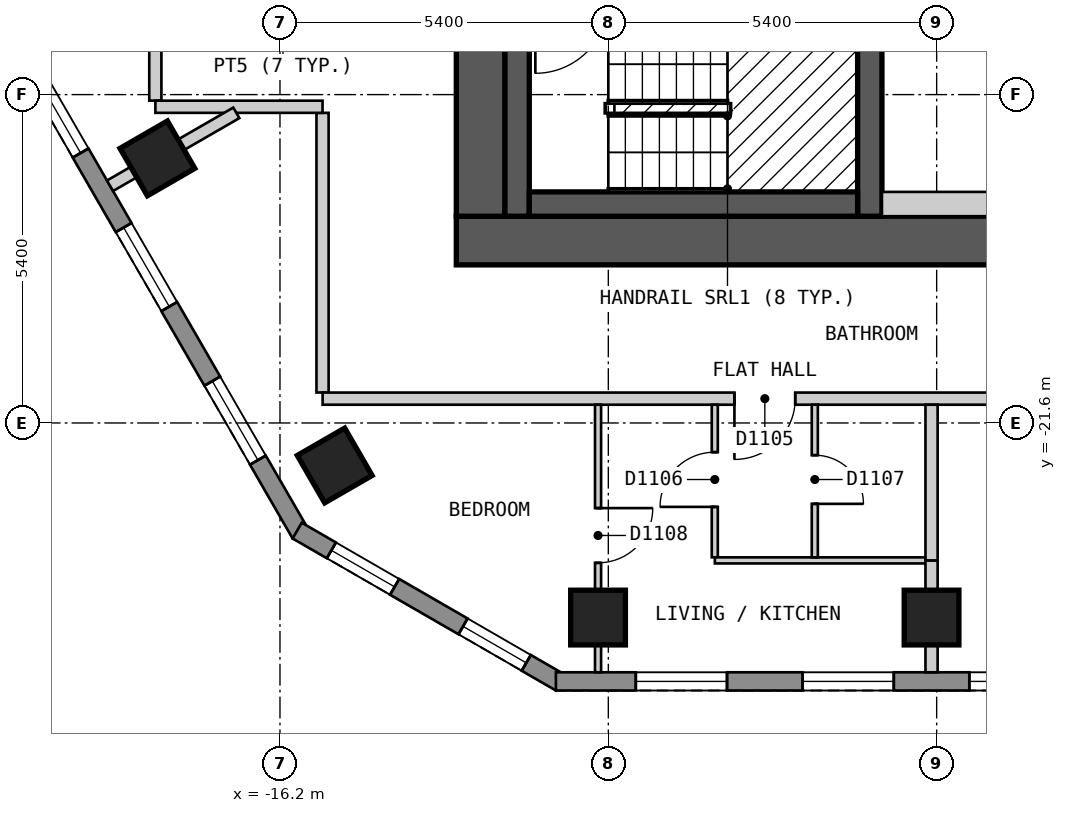
"""IFC4 building model, lengths in metres.
Left out: names, types, materials, properties, quantities, classifications, styles, units other than length and angle.
Written with IfcOpenShell. Run it as: python <this file> out.ifc"""

import sys

from ifc_helpers import new_model, si_unit, direction, frame, frame_2d, origin, origin_2d, place, context, subcontext, project, spatial, polyline, rectangle, outline, extrude, element, fill, save


model = new_model("IFC4")
c1 = context("Model", 3, precision=1e-05, world=origin(), true_north=direction((0.0, 1.0)))
c2 = subcontext(c1, "Body", "Model", "MODEL_VIEW")
j1 = project(units=[si_unit("LENGTHUNIT", "METRE"), si_unit("PLANEANGLEUNIT", "RADIAN")], contexts=[c1])
p1 = place(None, origin())
s1 = spatial("IfcSite", under=j1, at=p1, CompositionType="ELEMENT")
p2 = place(p1, origin())
s2 = spatial("IfcBuilding", under=s1, at=p2, CompositionType="ELEMENT")
p3 = place(p2, frame((0.0, 0.0, 144.6)))
s3 = spatial("IfcBuildingStorey", under=s2, at=p3, CompositionType="ELEMENT", Elevation=144.6)
for number, where, z_axis, x_axis in (
    (1, (-18.216, -17.249, 0.0), (0.0, 0.0, 1.0), (0.5, -0.866, 0.0)),
    (2, (-15.3, -22.299, 0.0), (0.0, 0.0, 1.0), (0.5, -0.866, 0.0)),
    (3, (-10.969, -24.8, 0.0), (0.0, 0.0, 1.0), (1.0, 0.0, 0.0)),
    (4, (-5.484, -24.8, 0.0), (0.0, 0.0, 1.0), (1.0, 0.0, 0.0)),
):
    element("IfcColumn", number, at=place(p3, frame(where, z_axis=z_axis, x_axis=x_axis)), inside=s3, PredefinedType="COLUMN", context=c2, shape_type="SweptSolid", body=[
        extrude(rectangle(XDim=0.9, YDim=0.9, at=origin_2d()), origin(), (0.0, 0.0, 1.0), 3.0),
    ])
p4 = place(p3, frame((-13.3, -18.6, 0.0), z_axis=(0.0, 0.0, 1.0), x_axis=(1.0, 0.0, 0.0)))
e5 = element("IfcWall", 5, at=p4, inside=s3, PredefinedType="SHEAR", context=c2, shape_type="SweptSolid", body=[
    extrude(rectangle(XDim=26.6, YDim=0.8, at=frame_2d((13.3, 0.0))), origin(), (0.0, 0.0, 1.0), 2.7),
])
p5 = place(p3, frame((-12.9, -18.2, 0.0), z_axis=(0.0, 0.0, 1.0), x_axis=(0.0, 1.0, 0.0)))
e6 = element("IfcWall", 6, at=p5, inside=s3, PredefinedType="SHEAR", context=c2, shape_type="SweptSolid", body=[
    extrude(rectangle(XDim=12.4, YDim=0.8, at=frame_2d((6.2, 0.0))), origin(), (0.0, 0.0, 1.0), 2.7),
])
p6 = place(p5, frame((4.0, 0.0, 0.0)))
e7 = element("IfcOpeningElement", 7, at=p6, cuts=e6, PredefinedType="OPENING", context=c2, shape_type="SweptSolid", body=[
    extrude(rectangle(XDim=1.2, YDim=2.1, at=frame_2d((0.6, 1.05))), frame((0.0, 0.41, 0.0), z_axis=(0.0, -1.0, 0.0), x_axis=(1.0, 0.0, 0.0)), (0.0, 0.0, 1.0), 0.82),
])
p7 = place(p3, frame((-6.5, -18.2, 0.0), z_axis=(0.0, 0.0, 1.0), x_axis=(0.0, 1.0, 0.0)))
e8 = element("IfcWall", 8, at=p7, inside=s3, PredefinedType="SHEAR", context=c2, shape_type="SweptSolid", body=[
    extrude(rectangle(XDim=3.35, YDim=0.4, at=frame_2d((1.675, 0.0))), origin(), (0.0, 0.0, 1.0), 2.7),
])
p8 = place(p3, frame((-28.218, -2.025, 0.0), z_axis=(0.0, 0.0, 1.0), x_axis=(0.500017503135, -0.866015298109, 0.0)))
e9 = element("IfcWall", 9, at=p8, inside=s3, PredefinedType="SOLIDWALL", context=c2, shape_type="SweptSolid", body=[
    extrude(outline(polyline([(0.0, -0.15), (24.711, -0.15), (24.631, 0.15), (0.08, 0.15), (0.0, -0.15)])), origin(), (0.0, 0.0, 1.0), 2.7),
])
p9 = place(p8, frame((1.4, 0.0, 0.15)))
e10 = element("IfcOpeningElement", 10, at=p9, cuts=e9, PredefinedType="OPENING", context=c2, shape_type="SweptSolid", body=[
    extrude(rectangle(XDim=1.5, YDim=2.1, at=frame_2d((0.75, 1.05))), frame((0.0, 0.16, 0.0), z_axis=(0.0, -1.0, 0.0), x_axis=(1.0, 0.0, 0.0)), (0.0, 0.0, 1.0), 0.32),
])
p10 = place(p8, frame((4.316, 0.0, 0.15)))
e11 = element("IfcOpeningElement", 11, at=p10, cuts=e9, PredefinedType="OPENING", context=c2, shape_type="SweptSolid", body=[
    extrude(rectangle(XDim=1.5, YDim=2.1, at=frame_2d((0.75, 1.05))), frame((0.0, 0.16, 0.0), z_axis=(0.0, -1.0, 0.0), x_axis=(1.0, 0.0, 0.0)), (0.0, 0.0, 1.0), 0.32),
])
p11 = place(p8, frame((7.231, 0.0, 0.15)))
e12 = element("IfcOpeningElement", 12, at=p11, cuts=e9, PredefinedType="OPENING", context=c2, shape_type="SweptSolid", body=[
    extrude(rectangle(XDim=1.5, YDim=2.1, at=frame_2d((0.75, 1.05))), frame((0.0, 0.16, 0.0), z_axis=(0.0, -1.0, 0.0), x_axis=(1.0, 0.0, 0.0)), (0.0, 0.0, 1.0), 0.32),
])
p12 = place(p8, frame((10.147, 0.0, 0.15)))
e13 = element("IfcOpeningElement", 13, at=p12, cuts=e9, PredefinedType="OPENING", context=c2, shape_type="SweptSolid", body=[
    extrude(rectangle(XDim=1.5, YDim=2.1, at=frame_2d((0.75, 1.05))), frame((0.0, 0.16, 0.0), z_axis=(0.0, -1.0, 0.0), x_axis=(1.0, 0.0, 0.0)), (0.0, 0.0, 1.0), 0.32),
])
p13 = place(p8, frame((13.062, 0.0, 0.15)))
e14 = element("IfcOpeningElement", 14, at=p13, cuts=e9, PredefinedType="OPENING", context=c2, shape_type="SweptSolid", body=[
    extrude(rectangle(XDim=1.5, YDim=2.1, at=frame_2d((0.75, 1.05))), frame((0.0, 0.16, 0.0), z_axis=(0.0, -1.0, 0.0), x_axis=(1.0, 0.0, 0.0)), (0.0, 0.0, 1.0), 0.32),
])
p14 = place(p8, frame((15.977, 0.0, 0.15)))
e15 = element("IfcOpeningElement", 15, at=p14, cuts=e9, PredefinedType="OPENING", context=c2, shape_type="SweptSolid", body=[
    extrude(rectangle(XDim=1.5, YDim=2.1, at=frame_2d((0.75, 1.05))), frame((0.0, 0.16, 0.0), z_axis=(0.0, -1.0, 0.0), x_axis=(1.0, 0.0, 0.0)), (0.0, 0.0, 1.0), 0.32),
])
p15 = place(p8, frame((18.893, 0.0, 0.15)))
e16 = element("IfcOpeningElement", 16, at=p15, cuts=e9, PredefinedType="OPENING", context=c2, shape_type="SweptSolid", body=[
    extrude(rectangle(XDim=1.5, YDim=2.1, at=frame_2d((0.75, 1.05))), frame((0.0, 0.16, 0.0), z_axis=(0.0, -1.0, 0.0), x_axis=(1.0, 0.0, 0.0)), (0.0, 0.0, 1.0), 0.32),
])
p16 = place(p8, frame((21.809, 0.0, 0.15)))
e17 = element("IfcOpeningElement", 17, at=p16, cuts=e9, PredefinedType="OPENING", context=c2, shape_type="SweptSolid", body=[
    extrude(rectangle(XDim=1.5, YDim=2.1, at=frame_2d((0.75, 1.05))), frame((0.0, 0.16, 0.0), z_axis=(0.0, -1.0, 0.0), x_axis=(1.0, 0.0, 0.0)), (0.0, 0.0, 1.0), 0.32),
])
p17 = place(p3, frame((-15.917, -23.37, 0.0), z_axis=(0.0, 0.0, 1.0), x_axis=(0.866022959057, -0.500004234368, 0.0)))
e18 = element("IfcWall", 18, at=p17, inside=s3, PredefinedType="SOLIDWALL", context=c2, shape_type="SweptSolid", body=[
    extrude(outline(polyline([(0.0, -0.15), (5.0, -0.15), (4.92, 0.15), (0.08, 0.15), (0.0, -0.15)])), origin(), (0.0, 0.0, 1.0), 2.7),
])
p18 = place(p17, frame((0.65, 0.0, 0.15)))
e19 = element("IfcOpeningElement", 19, at=p18, cuts=e18, PredefinedType="OPENING", context=c2, shape_type="SweptSolid", body=[
    extrude(rectangle(XDim=1.2, YDim=2.1, at=frame_2d((0.6, 1.05))), frame((0.0, 0.16, 0.0), z_axis=(0.0, -1.0, 0.0), x_axis=(1.0, 0.0, 0.0)), (0.0, 0.0, 1.0), 0.32),
])
p19 = place(p17, frame((3.15, 0.0, 0.15)))
e20 = element("IfcOpeningElement", 20, at=p19, cuts=e18, PredefinedType="OPENING", context=c2, shape_type="SweptSolid", body=[
    extrude(rectangle(XDim=1.2, YDim=2.1, at=frame_2d((0.6, 1.05))), frame((0.0, 0.16, 0.0), z_axis=(0.0, -1.0, 0.0), x_axis=(1.0, 0.0, 0.0)), (0.0, 0.0, 1.0), 0.32),
])
p20 = place(p3, frame((-11.662, -25.85, 0.0), z_axis=(0.0, 0.0, 1.0), x_axis=(1.0, 0.0, 0.0)))
e21 = element("IfcWall", 21, at=p20, inside=s3, PredefinedType="SOLIDWALL", context=c2, shape_type="SweptSolid", body=[
    extrude(outline(polyline([(0.0, -0.15), (23.324, -0.15), (23.244, 0.15), (0.08, 0.15), (0.0, -0.15)])), origin(), (0.0, 0.0, 1.0), 2.7),
])
p21 = place(p20, frame((1.314, 0.0, 0.15)))
e22 = element("IfcOpeningElement", 22, at=p21, cuts=e21, PredefinedType="OPENING", context=c2, shape_type="SweptSolid", body=[
    extrude(rectangle(XDim=1.5, YDim=2.1, at=frame_2d((0.75, 1.05))), frame((0.0, 0.16, 0.0), z_axis=(0.0, -1.0, 0.0), x_axis=(1.0, 0.0, 0.0)), (0.0, 0.0, 1.0), 0.32),
])
p22 = place(p20, frame((4.057, 0.0, 0.15)))
e23 = element("IfcOpeningElement", 23, at=p22, cuts=e21, PredefinedType="OPENING", context=c2, shape_type="SweptSolid", body=[
    extrude(rectangle(XDim=1.5, YDim=2.1, at=frame_2d((0.75, 1.05))), frame((0.0, 0.16, 0.0), z_axis=(0.0, -1.0, 0.0), x_axis=(1.0, 0.0, 0.0)), (0.0, 0.0, 1.0), 0.32),
])
p23 = place(p20, frame((6.799, 0.0, 0.15)))
e24 = element("IfcOpeningElement", 24, at=p23, cuts=e21, PredefinedType="OPENING", context=c2, shape_type="SweptSolid", body=[
    extrude(rectangle(XDim=1.5, YDim=2.1, at=frame_2d((0.75, 1.05))), frame((0.0, 0.16, 0.0), z_axis=(0.0, -1.0, 0.0), x_axis=(1.0, 0.0, 0.0)), (0.0, 0.0, 1.0), 0.32),
])
p24 = place(p20, frame((9.542, 0.0, 0.15)))
e25 = element("IfcOpeningElement", 25, at=p24, cuts=e21, PredefinedType="OPENING", context=c2, shape_type="SweptSolid", body=[
    extrude(rectangle(XDim=1.5, YDim=2.1, at=frame_2d((0.75, 1.05))), frame((0.0, 0.16, 0.0), z_axis=(0.0, -1.0, 0.0), x_axis=(1.0, 0.0, 0.0)), (0.0, 0.0, 1.0), 0.32),
])
p25 = place(p20, frame((12.284, 0.0, 0.15)))
e26 = element("IfcOpeningElement", 26, at=p25, cuts=e21, PredefinedType="OPENING", context=c2, shape_type="SweptSolid", body=[
    extrude(rectangle(XDim=1.5, YDim=2.1, at=frame_2d((0.75, 1.05))), frame((0.0, 0.16, 0.0), z_axis=(0.0, -1.0, 0.0), x_axis=(1.0, 0.0, 0.0)), (0.0, 0.0, 1.0), 0.32),
])
p26 = place(p20, frame((15.027, 0.0, 0.15)))
e27 = element("IfcOpeningElement", 27, at=p26, cuts=e21, PredefinedType="OPENING", context=c2, shape_type="SweptSolid", body=[
    extrude(rectangle(XDim=1.5, YDim=2.1, at=frame_2d((0.75, 1.05))), frame((0.0, 0.16, 0.0), z_axis=(0.0, -1.0, 0.0), x_axis=(1.0, 0.0, 0.0)), (0.0, 0.0, 1.0), 0.32),
])
p27 = place(p20, frame((17.769, 0.0, 0.15)))
e28 = element("IfcOpeningElement", 28, at=p27, cuts=e21, PredefinedType="OPENING", context=c2, shape_type="SweptSolid", body=[
    extrude(rectangle(XDim=1.5, YDim=2.1, at=frame_2d((0.75, 1.05))), frame((0.0, 0.16, 0.0), z_axis=(0.0, -1.0, 0.0), x_axis=(1.0, 0.0, 0.0)), (0.0, 0.0, 1.0), 0.32),
])
p28 = place(p20, frame((20.512, 0.0, 0.15)))
e29 = element("IfcOpeningElement", 29, at=p28, cuts=e21, PredefinedType="OPENING", context=c2, shape_type="SweptSolid", body=[
    extrude(rectangle(XDim=1.5, YDim=2.1, at=frame_2d((0.75, 1.05))), frame((0.0, 0.16, 0.0), z_axis=(0.0, -1.0, 0.0), x_axis=(1.0, 0.0, 0.0)), (0.0, 0.0, 1.0), 0.32),
])
p29 = place(p3, frame((-15.5, -16.5, 0.0), z_axis=(0.0, 0.0, 1.0), x_axis=(0.0, -1.0, 0.0)))
e30 = element("IfcWall", 30, at=p29, inside=s3, PredefinedType="PARTITIONING", context=c2, shape_type="SweptSolid", body=[
    extrude(rectangle(XDim=4.599, YDim=0.2, at=frame_2d((2.3, 0.0))), origin(), (0.0, 0.0, 1.0), 2.7),
])
p30 = place(p3, frame((-18.25, -10.593, 0.0), z_axis=(0.0, 0.0, 1.0), x_axis=(0.0, -1.0, 0.0)))
e31 = element("IfcWall", 31, at=p30, inside=s3, PredefinedType="PARTITIONING", context=c2, shape_type="SweptSolid", body=[
    extrude(rectangle(XDim=5.706, YDim=0.2, at=frame_2d((2.853, 0.0))), origin(), (0.0, 0.0, 1.0), 2.7),
])
p31 = place(p3, frame((-18.249, -16.4, 0.0), z_axis=(0.0, 0.0, 1.0), x_axis=(1.0, 0.0, 0.0)))
e32 = element("IfcWall", 32, at=p31, inside=s3, PredefinedType="PARTITIONING", context=c2, shape_type="SweptSolid", body=[
    extrude(rectangle(XDim=2.749, YDim=0.2, at=frame_2d((1.375, 0.0))), origin(), (0.0, 0.0, 1.0), 2.7),
])
p32 = place(p3, frame((-15.499, -21.2, 0.0), z_axis=(0.0, 0.0, 1.0), x_axis=(1.0, 0.0, 0.0)))
e33 = element("IfcWall", 33, at=p32, inside=s3, PredefinedType="PARTITIONING", context=c2, shape_type="SweptSolid", body=[
    extrude(rectangle(XDim=30.898, YDim=0.2, at=frame_2d((15.449, 0.0))), origin(), (0.0, 0.0, 1.0), 2.7),
])
p33 = place(p32, frame((6.773, 0.0, 0.0)))
e34 = element("IfcOpeningElement", 34, at=p33, cuts=e33, PredefinedType="OPENING", context=c2, shape_type="SweptSolid", body=[
    extrude(rectangle(XDim=1.0, YDim=2.1, at=frame_2d((0.5, 1.05))), frame((0.0, 0.11, 0.0), z_axis=(0.0, -1.0, 0.0), x_axis=(1.0, 0.0, 0.0)), (0.0, 0.0, 1.0), 0.22),
])
p34 = place(p32, frame((23.228, 0.0, 0.0)))
e35 = element("IfcOpeningElement", 35, at=p34, cuts=e33, PredefinedType="OPENING", context=c2, shape_type="SweptSolid", body=[
    extrude(rectangle(XDim=1.0, YDim=2.1, at=frame_2d((0.5, 1.05))), frame((0.0, 0.11, 0.0), z_axis=(0.0, -1.0, 0.0), x_axis=(1.0, 0.0, 0.0)), (0.0, 0.0, 1.0), 0.22),
])
p35 = place(p3, frame((-9.049, -21.3, 0.0), z_axis=(0.0, 0.0, 1.0), x_axis=(0.0, -1.0, 0.0)))
e36 = element("IfcWall", 36, at=p35, inside=s3, PredefinedType="PARTITIONING", context=c2, shape_type="SweptSolid", body=[
    extrude(rectangle(XDim=2.509, YDim=0.1, at=frame_2d((1.254, 0.0))), origin(), (0.0, 0.0, 1.0), 2.7),
])
p36 = place(p35, frame((0.78, 0.0, 0.0)))
e37 = element("IfcOpeningElement", 37, at=p36, cuts=e36, PredefinedType="OPENING", context=c2, shape_type="SweptSolid", body=[
    extrude(rectangle(XDim=0.9, YDim=2.1, at=frame_2d((0.45, 1.05))), frame((0.0, 0.06, 0.0), z_axis=(0.0, -1.0, 0.0), x_axis=(1.0, 0.0, 0.0)), (0.0, 0.0, 1.0), 0.12),
])
p37 = place(p3, frame((-9.048, -23.86, 0.0), z_axis=(0.0, 0.0, 1.0), x_axis=(1.0, 0.0, 0.0)))
e38 = element("IfcWall", 38, at=p37, inside=s3, PredefinedType="PARTITIONING", context=c2, shape_type="SweptSolid", body=[
    extrude(rectangle(XDim=3.464, YDim=0.1, at=frame_2d((1.732, 0.0))), origin(), (0.0, 0.0, 1.0), 2.7),
])
p38 = place(p3, frame((-7.404, -23.81, 0.0), z_axis=(0.0, 0.0, 1.0), x_axis=(0.0, 1.0, 0.0)))
e39 = element("IfcWall", 39, at=p38, inside=s3, PredefinedType="PARTITIONING", context=c2, shape_type="SweptSolid", body=[
    extrude(rectangle(XDim=2.51, YDim=0.1, at=frame_2d((1.255, 0.0))), origin(), (0.0, 0.0, 1.0), 2.7),
])
p39 = place(p38, frame((0.88, 0.0, 0.0)))
e40 = element("IfcOpeningElement", 40, at=p39, cuts=e39, PredefinedType="OPENING", context=c2, shape_type="SweptSolid", body=[
    extrude(rectangle(XDim=0.8, YDim=2.1, at=frame_2d((0.4, 1.05))), frame((0.0, 0.06, 0.0), z_axis=(0.0, -1.0, 0.0), x_axis=(1.0, 0.0, 0.0)), (0.0, 0.0, 1.0), 0.12),
])
p40 = place(p3, frame((-10.969, -25.7, 0.0), z_axis=(0.0, 0.0, 1.0), x_axis=(0.0, 1.0, 0.0)))
e41 = element("IfcWall", 41, at=p40, inside=s3, PredefinedType="PARTITIONING", context=c2, shape_type="SweptSolid", body=[
    extrude(rectangle(XDim=4.4, YDim=0.1, at=frame_2d((2.2, 0.0))), origin(), (0.0, 0.0, 1.0), 2.7),
])
p41 = place(p40, frame((1.8, 0.0, 0.0)))
e42 = element("IfcOpeningElement", 42, at=p41, cuts=e41, PredefinedType="OPENING", context=c2, shape_type="SweptSolid", body=[
    extrude(rectangle(XDim=0.9, YDim=2.1, at=frame_2d((0.45, 1.05))), frame((0.0, 0.06, 0.0), z_axis=(0.0, -1.0, 0.0), x_axis=(1.0, 0.0, 0.0)), (0.0, 0.0, 1.0), 0.12),
])
p42 = place(p3, frame((-5.484, -23.86, 0.0), z_axis=(0.0, 0.0, 1.0), x_axis=(0.0, -1.0, 0.0)))
e43 = element("IfcWall", 43, at=p42, inside=s3, PredefinedType="PARTITIONING", context=c2, shape_type="SweptSolid", body=[
    extrude(rectangle(XDim=1.84, YDim=0.2, at=frame_2d((0.92, 0.0))), origin(), (0.0, 0.0, 1.0), 2.7),
])
p43 = place(p3, frame((-5.484, -23.86, 0.0), z_axis=(0.0, 0.0, 1.0), x_axis=(0.0, 1.0, 0.0)))
e44 = element("IfcWall", 44, at=p43, inside=s3, PredefinedType="PARTITIONING", context=c2, shape_type="SweptSolid", body=[
    extrude(rectangle(XDim=2.56, YDim=0.2, at=frame_2d((1.28, 0.0))), origin(), (0.0, 0.0, 1.0), 2.7),
])
p44 = place(p3, frame((-18.995, -17.699, 0.0), z_axis=(0.0, 0.0, 1.0), x_axis=(0.86607371389, 0.499916315105, 0.0)))
e45 = element("IfcWall", 45, at=p44, inside=s3, PredefinedType="PARTITIONING", context=c2, shape_type="SweptSolid", body=[
    extrude(rectangle(XDim=2.398, YDim=0.2, at=frame_2d((1.199, 0.0))), origin(), (0.0, 0.0, 1.0), 2.7),
])
p45 = place(p3, frame((-12.3, -18.2, 0.0), z_axis=(0.0, 0.0, 1.0), x_axis=(0.0, 1.0, 0.0)))
e46 = element("IfcWall", 46, at=p45, inside=s3, PredefinedType="SOLIDWALL", context=c2, shape_type="SweptSolid", body=[
    extrude(rectangle(XDim=3.35, YDim=0.4, at=frame_2d((1.675, 0.0))), origin(), (0.0, 0.0, 1.0), 2.7),
])
p46 = place(p3, frame((-12.1, -18.0, 0.0), z_axis=(0.0, 0.0, 1.0), x_axis=(1.0, 0.0, 0.0)))
e47 = element("IfcWall", 47, at=p46, inside=s3, PredefinedType="SOLIDWALL", context=c2, shape_type="SweptSolid", body=[
    extrude(rectangle(XDim=5.4, YDim=0.4, at=frame_2d((2.7, 0.0))), origin(), (0.0, 0.0, 1.0), 2.7),
])
p47 = place(p3, frame((-6.3, -18.0, 0.0), z_axis=(0.0, 0.0, 1.0), x_axis=(1.0, 0.0, 0.0)))
e48 = element("IfcWall", 48, at=p47, inside=s3, PredefinedType="PARTITIONING", context=c2, shape_type="SweptSolid", body=[
    extrude(rectangle(XDim=12.6, YDim=0.4, at=frame_2d((6.3, 0.0))), origin(), (0.0, 0.0, 1.0), 2.7),
])
p48 = place(p14, origin())
e49 = element("IfcWindow", 49, at=p48, inside=s3, PartitioningType="SINGLE_PANEL", PredefinedType="WINDOW", context=c2, shape_type="SweptSolid", body=[
    extrude(rectangle(XDim=1.5, YDim=2.1, at=frame_2d((0.75, 1.05))), frame((0.0, 0.03, 0.0), z_axis=(0.0, -1.0, 0.0), x_axis=(1.0, 0.0, 0.0)), (0.0, 0.0, 1.0), 0.06),
])
fill(e15, e49)
p49 = place(p15, origin())
e50 = element("IfcWindow", 50, at=p49, inside=s3, PartitioningType="SINGLE_PANEL", PredefinedType="WINDOW", context=c2, shape_type="SweptSolid", body=[
    extrude(rectangle(XDim=1.5, YDim=2.1, at=frame_2d((0.75, 1.05))), frame((0.0, 0.03, 0.0), z_axis=(0.0, -1.0, 0.0), x_axis=(1.0, 0.0, 0.0)), (0.0, 0.0, 1.0), 0.06),
])
fill(e16, e50)
p50 = place(p16, origin())
e51 = element("IfcWindow", 51, at=p50, inside=s3, PartitioningType="SINGLE_PANEL", PredefinedType="WINDOW", context=c2, shape_type="SweptSolid", body=[
    extrude(rectangle(XDim=1.5, YDim=2.1, at=frame_2d((0.75, 1.05))), frame((0.0, 0.03, 0.0), z_axis=(0.0, -1.0, 0.0), x_axis=(1.0, 0.0, 0.0)), (0.0, 0.0, 1.0), 0.06),
])
fill(e17, e51)
p51 = place(p18, origin())
e52 = element("IfcWindow", 52, at=p51, inside=s3, PartitioningType="SINGLE_PANEL", PredefinedType="WINDOW", context=c2, shape_type="SweptSolid", body=[
    extrude(rectangle(XDim=1.2, YDim=2.1, at=frame_2d((0.6, 1.05))), frame((0.0, 0.03, 0.0), z_axis=(0.0, -1.0, 0.0), x_axis=(1.0, 0.0, 0.0)), (0.0, 0.0, 1.0), 0.06),
])
fill(e19, e52)
p52 = place(p19, origin())
e53 = element("IfcWindow", 53, at=p52, inside=s3, PartitioningType="SINGLE_PANEL", PredefinedType="WINDOW", context=c2, shape_type="SweptSolid", body=[
    extrude(rectangle(XDim=1.2, YDim=2.1, at=frame_2d((0.6, 1.05))), frame((0.0, 0.03, 0.0), z_axis=(0.0, -1.0, 0.0), x_axis=(1.0, 0.0, 0.0)), (0.0, 0.0, 1.0), 0.06),
])
fill(e20, e53)
p53 = place(p21, origin())
e54 = element("IfcWindow", 54, at=p53, inside=s3, PartitioningType="SINGLE_PANEL", PredefinedType="WINDOW", context=c2, shape_type="SweptSolid", body=[
    extrude(rectangle(XDim=1.5, YDim=2.1, at=frame_2d((0.75, 1.05))), frame((0.0, 0.03, 0.0), z_axis=(0.0, -1.0, 0.0), x_axis=(1.0, 0.0, 0.0)), (0.0, 0.0, 1.0), 0.06),
])
fill(e22, e54)
p54 = place(p22, origin())
e55 = element("IfcWindow", 55, at=p54, inside=s3, PartitioningType="SINGLE_PANEL", PredefinedType="WINDOW", context=c2, shape_type="SweptSolid", body=[
    extrude(rectangle(XDim=1.5, YDim=2.1, at=frame_2d((0.75, 1.05))), frame((0.0, 0.03, 0.0), z_axis=(0.0, -1.0, 0.0), x_axis=(1.0, 0.0, 0.0)), (0.0, 0.0, 1.0), 0.06),
])
fill(e23, e55)
p55 = place(p23, origin())
e56 = element("IfcWindow", 56, at=p55, inside=s3, PartitioningType="SINGLE_PANEL", PredefinedType="WINDOW", context=c2, shape_type="SweptSolid", body=[
    extrude(rectangle(XDim=1.5, YDim=2.1, at=frame_2d((0.75, 1.05))), frame((0.0, 0.03, 0.0), z_axis=(0.0, -1.0, 0.0), x_axis=(1.0, 0.0, 0.0)), (0.0, 0.0, 1.0), 0.06),
])
fill(e24, e56)
p56 = place(p33, origin())
e57 = element("IfcDoor", 57, at=p56, inside=s3, OperationType="SINGLE_SWING_LEFT", PredefinedType="DOOR", context=c2, shape_type="SweptSolid", body=[
    extrude(rectangle(XDim=1.0, YDim=2.1, at=frame_2d((0.5, 1.05))), frame((0.0, 0.025, 0.0), z_axis=(0.0, -1.0, 0.0), x_axis=(1.0, 0.0, 0.0)), (0.0, 0.0, 1.0), 0.05),
])
fill(e34, e57)
p57 = place(p36, origin())
e58 = element("IfcDoor", 58, at=p57, inside=s3, OperationType="SINGLE_SWING_RIGHT", PredefinedType="DOOR", context=c2, shape_type="SweptSolid", body=[
    extrude(rectangle(XDim=0.9, YDim=2.1, at=frame_2d((0.45, 1.05))), frame((0.0, 0.025, 0.0), z_axis=(0.0, -1.0, 0.0), x_axis=(1.0, 0.0, 0.0)), (0.0, 0.0, 1.0), 0.05),
])
fill(e37, e58)
p58 = place(p39, origin())
e59 = element("IfcDoor", 59, at=p58, inside=s3, OperationType="SINGLE_SWING_LEFT", PredefinedType="DOOR", context=c2, shape_type="SweptSolid", body=[
    extrude(rectangle(XDim=0.8, YDim=2.1, at=frame_2d((0.4, 1.05))), frame((0.0, 0.025, 0.0), z_axis=(0.0, -1.0, 0.0), x_axis=(1.0, 0.0, 0.0)), (0.0, 0.0, 1.0), 0.05),
])
fill(e40, e59)
p59 = place(p41, origin())
e60 = element("IfcDoor", 60, at=p59, inside=s3, OperationType="SINGLE_SWING_RIGHT", PredefinedType="DOOR", context=c2, shape_type="SweptSolid", body=[
    extrude(rectangle(XDim=0.9, YDim=2.1, at=frame_2d((0.45, 1.05))), frame((0.0, 0.025, 0.0), z_axis=(0.0, -1.0, 0.0), x_axis=(1.0, 0.0, 0.0)), (0.0, 0.0, 1.0), 0.05),
])
fill(e42, e60)
save(model, sys.argv[1])
